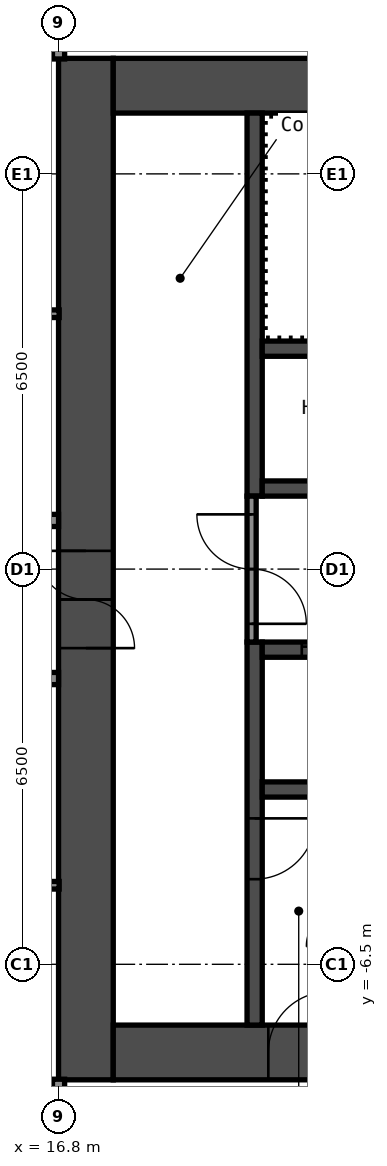
"""IFC4 building model, lengths in metres.
Left out: names, types, materials, properties, quantities, classifications, styles, units other than length and angle.
Written with IfcOpenShell. Run it as: python <this file> out.ifc"""

import sys

from ifc_helpers import new_model, si_unit, direction, frame, frame_2d, origin, place, context, subcontext, project, spatial, rectangle, extrude, element, fill, save


model = new_model("IFC4")
c1 = context("Model", 3, precision=1e-05, world=origin(), true_north=direction((0.0, 1.0)))
c2 = subcontext(c1, "Body", "Model", "MODEL_VIEW")
j1 = project(units=[si_unit("LENGTHUNIT", "METRE"), si_unit("PLANEANGLEUNIT", "RADIAN")], contexts=[c1])
p1 = place(None, origin())
s1 = spatial("IfcSite", under=j1, at=p1, CompositionType="ELEMENT")
p2 = place(p1, origin())
s2 = spatial("IfcBuilding", under=s1, at=p2, CompositionType="ELEMENT")
p3 = place(p2, frame((0.0, 0.0, 172.6)))
s3 = spatial("IfcBuildingStorey", under=s2, at=p3, CompositionType="ELEMENT", Elevation=172.6)
p4 = place(p3, frame((17.25, -8.4, 0.0), z_axis=(0.0, 0.0, 1.0), x_axis=(0.0, 1.0, 0.0)))
e1 = element("IfcWall", 1, at=p4, inside=s3, PredefinedType="SHEAR", context=c2, shape_type="SweptSolid", body=[
    extrude(rectangle(XDim=16.8, YDim=0.9, at=frame_2d((8.4, 0.0))), origin(), (0.0, 0.0, 1.0), 2.9),
])
p5 = place(p4, frame((7.1, 0.0, 0.0)))
e2 = element("IfcOpeningElement", 2, at=p5, cuts=e1, PredefinedType="OPENING", context=c2, shape_type="SweptSolid", body=[
    extrude(rectangle(XDim=1.6, YDim=2.1, at=frame_2d((0.8, 1.05))), frame((0.0, 0.46, 0.0), z_axis=(0.0, -1.0, 0.0), x_axis=(1.0, 0.0, 0.0)), (0.0, 0.0, 1.0), 0.92),
])
p6 = place(p3, frame((17.7, 7.95, 0.0), z_axis=(0.0, 0.0, 1.0), x_axis=(1.0, 0.0, 0.0)))
e3 = element("IfcWall", 3, at=p6, inside=s3, PredefinedType="SHEAR", context=c2, shape_type="SweptSolid", body=[
    extrude(rectangle(XDim=15.0, YDim=0.9, at=frame_2d((7.5, 0.0))), origin(), (0.0, 0.0, 1.0), 2.9),
])
p7 = place(p6, frame((10.4, 0.0, 0.0)))
e4 = element("IfcOpeningElement", 4, at=p7, cuts=e3, PredefinedType="OPENING", context=c2, shape_type="SweptSolid", body=[
    extrude(rectangle(XDim=1.2, YDim=2.1, at=frame_2d((0.6, 1.05))), frame((0.0, 0.46, 0.0), z_axis=(0.0, -1.0, 0.0), x_axis=(1.0, 0.0, 0.0)), (0.0, 0.0, 1.0), 0.92),
])
p8 = place(p6, frame((13.35, 0.0, 0.0)))
e5 = element("IfcOpeningElement", 5, at=p8, cuts=e3, PredefinedType="OPENING", context=c2, shape_type="SweptSolid", body=[
    extrude(rectangle(XDim=0.9, YDim=2.1, at=frame_2d((0.45, 1.05))), frame((0.0, 0.46, 0.0), z_axis=(0.0, -1.0, 0.0), x_axis=(1.0, 0.0, 0.0)), (0.0, 0.0, 1.0), 0.92),
])
p9 = place(p3, frame((17.7, -7.95, 0.0), z_axis=(0.0, 0.0, 1.0), x_axis=(1.0, 0.0, 0.0)))
e6 = element("IfcWall", 6, at=p9, inside=s3, PredefinedType="SHEAR", context=c2, shape_type="SweptSolid", body=[
    extrude(rectangle(XDim=15.0, YDim=0.9, at=frame_2d((7.5, 0.0))), origin(), (0.0, 0.0, 1.0), 2.9),
])
p10 = place(p9, frame((2.55, 0.0, 0.0)))
e7 = element("IfcOpeningElement", 7, at=p10, cuts=e6, PredefinedType="OPENING", context=c2, shape_type="SweptSolid", body=[
    extrude(rectangle(XDim=1.0, YDim=2.1, at=frame_2d((0.5, 1.05))), frame((0.0, 0.46, 0.0), z_axis=(0.0, -1.0, 0.0), x_axis=(1.0, 0.0, 0.0)), (0.0, 0.0, 1.0), 0.92),
])
p11 = place(p3, frame((20.025, 1.2, 0.0), z_axis=(0.0, 0.0, 1.0), x_axis=(0.0, 1.0, 0.0)))
e8 = element("IfcWall", 8, at=p11, inside=s3, PredefinedType="SHEAR", context=c2, shape_type="SweptSolid", body=[
    extrude(rectangle(XDim=6.3, YDim=0.25, at=frame_2d((3.15, 0.0))), origin(), (0.0, 0.0, 1.0), 2.9),
])
p12 = place(p3, frame((20.025, -7.5, 0.0), z_axis=(0.0, 0.0, 1.0), x_axis=(0.0, 1.0, 0.0)))
e9 = element("IfcWall", 9, at=p12, inside=s3, PredefinedType="SHEAR", context=c2, shape_type="SweptSolid", body=[
    extrude(rectangle(XDim=6.3, YDim=0.25, at=frame_2d((3.15, 0.0))), origin(), (0.0, 0.0, 1.0), 2.9),
])
p13 = place(p12, frame((2.4, 0.0, 0.0)))
e10 = element("IfcOpeningElement", 10, at=p13, cuts=e9, PredefinedType="OPENING", context=c2, shape_type="SweptSolid", body=[
    extrude(rectangle(XDim=1.0, YDim=2.1, at=frame_2d((0.5, 1.05))), frame((0.0, 0.135, 0.0), z_axis=(0.0, -1.0, 0.0), x_axis=(1.0, 0.0, 0.0)), (0.0, 0.0, 1.0), 0.27),
])
p14 = place(p3, frame((20.15, 1.325, 0.0), z_axis=(0.0, 0.0, 1.0), x_axis=(1.0, 0.0, 0.0)))
e11 = element("IfcWall", 11, at=p14, inside=s3, PredefinedType="SHEAR", context=c2, shape_type="SweptSolid", body=[
    extrude(rectangle(XDim=7.5, YDim=0.25, at=frame_2d((3.75, 0.0))), origin(), (0.0, 0.0, 1.0), 2.9),
])
p15 = place(p14, frame((2.038, 0.0, 0.0)))
e12 = element("IfcOpeningElement", 12, at=p15, cuts=e11, PredefinedType="OPENING", context=c2, shape_type="SweptSolid", body=[
    extrude(rectangle(XDim=0.9, YDim=2.1, at=frame_2d((0.45, 1.05))), frame((0.0, 0.135, 0.0), z_axis=(0.0, -1.0, 0.0), x_axis=(1.0, 0.0, 0.0)), (0.0, 0.0, 1.0), 0.27),
])
p16 = place(p14, frame((5.738, 0.0, 0.0)))
e13 = element("IfcOpeningElement", 13, at=p16, cuts=e11, PredefinedType="OPENING", context=c2, shape_type="SweptSolid", body=[
    extrude(rectangle(XDim=0.9, YDim=2.1, at=frame_2d((0.45, 1.05))), frame((0.0, 0.135, 0.0), z_axis=(0.0, -1.0, 0.0), x_axis=(1.0, 0.0, 0.0)), (0.0, 0.0, 1.0), 0.27),
])
p17 = place(p3, frame((20.15, 3.625, 0.0), z_axis=(0.0, 0.0, 1.0), x_axis=(1.0, 0.0, 0.0)))
e14 = element("IfcWall", 14, at=p17, inside=s3, PredefinedType="SHEAR", context=c2, shape_type="SweptSolid", body=[
    extrude(rectangle(XDim=7.5, YDim=0.25, at=frame_2d((3.75, 0.0))), origin(), (0.0, 0.0, 1.0), 2.9),
])
p18 = place(p3, frame((20.15, -1.325, 0.0), z_axis=(0.0, 0.0, 1.0), x_axis=(1.0, 0.0, 0.0)))
e15 = element("IfcWall", 15, at=p18, inside=s3, PredefinedType="SHEAR", context=c2, shape_type="SweptSolid", body=[
    extrude(rectangle(XDim=7.5, YDim=0.25, at=frame_2d((3.75, 0.0))), origin(), (0.0, 0.0, 1.0), 2.9),
])
p19 = place(p18, frame((0.65, 0.0, 0.0)))
e16 = element("IfcOpeningElement", 16, at=p19, cuts=e15, PredefinedType="OPENING", context=c2, shape_type="SweptSolid", body=[
    extrude(rectangle(XDim=1.1, YDim=2.1, at=frame_2d((0.55, 1.05))), frame((0.0, 0.135, 0.0), z_axis=(0.0, -1.0, 0.0), x_axis=(1.0, 0.0, 0.0)), (0.0, 0.0, 1.0), 0.27),
])
p20 = place(p18, frame((3.05, 0.0, 0.0)))
e17 = element("IfcOpeningElement", 17, at=p20, cuts=e15, PredefinedType="OPENING", context=c2, shape_type="SweptSolid", body=[
    extrude(rectangle(XDim=1.1, YDim=2.1, at=frame_2d((0.55, 1.05))), frame((0.0, 0.135, 0.0), z_axis=(0.0, -1.0, 0.0), x_axis=(1.0, 0.0, 0.0)), (0.0, 0.0, 1.0), 0.27),
])
p21 = place(p18, frame((5.45, 0.0, 0.0)))
e18 = element("IfcOpeningElement", 18, at=p21, cuts=e15, PredefinedType="OPENING", context=c2, shape_type="SweptSolid", body=[
    extrude(rectangle(XDim=1.1, YDim=2.1, at=frame_2d((0.55, 1.05))), frame((0.0, 0.135, 0.0), z_axis=(0.0, -1.0, 0.0), x_axis=(1.0, 0.0, 0.0)), (0.0, 0.0, 1.0), 0.27),
])
p22 = place(p3, frame((20.15, -3.625, 0.0), z_axis=(0.0, 0.0, 1.0), x_axis=(1.0, 0.0, 0.0)))
e19 = element("IfcWall", 19, at=p22, inside=s3, PredefinedType="SHEAR", context=c2, shape_type="SweptSolid", body=[
    extrude(rectangle(XDim=7.5, YDim=0.25, at=frame_2d((3.75, 0.0))), origin(), (0.0, 0.0, 1.0), 2.9),
])
p23 = place(p3, frame((19.975, -1.2, 0.0), z_axis=(0.0, 0.0, 1.0), x_axis=(0.0, 1.0, 0.0)))
e20 = element("IfcWall", 20, at=p23, inside=s3, PredefinedType="PARTITIONING", context=c2, shape_type="SweptSolid", body=[
    extrude(rectangle(XDim=2.4, YDim=0.15, at=frame_2d((1.2, 0.0))), origin(), (0.0, 0.0, 1.0), 2.9),
])
p24 = place(p23, frame((0.3, 0.0, 0.0)))
e21 = element("IfcOpeningElement", 21, at=p24, cuts=e20, PredefinedType="OPENING", context=c2, shape_type="SweptSolid", body=[
    extrude(rectangle(XDim=1.8, YDim=2.1, at=frame_2d((0.9, 1.05))), frame((0.0, 0.085, 0.0), z_axis=(0.0, -1.0, 0.0), x_axis=(1.0, 0.0, 0.0)), (0.0, 0.0, 1.0), 0.17),
])
p25 = place(p3, frame((13.462, -5.2, 0.0), z_axis=(0.0, 0.0, 1.0), x_axis=(1.0, 0.0, 0.0)))
e22 = element("IfcWall", 22, at=p25, inside=s3, PredefinedType="PARTITIONING", context=c2, shape_type="SweptSolid", body=[
    extrude(rectangle(XDim=3.348, YDim=0.125, at=frame_2d((1.674, 0.0))), origin(), (0.0, 0.0, 1.0), 2.9),
])
p26 = place(p25, frame((1.238, 0.0, 0.0)))
e23 = element("IfcOpeningElement", 23, at=p26, cuts=e22, PredefinedType="OPENING", context=c2, shape_type="SweptSolid", body=[
    extrude(rectangle(XDim=0.8, YDim=2.1, at=frame_2d((0.4, 1.05))), frame((0.0, 0.073, 0.0), z_axis=(0.0, -1.0, 0.0), x_axis=(1.0, 0.0, 0.0)), (0.0, 0.0, 1.0), 0.145),
])
p27 = place(p3, frame((-16.8, -1.8, 0.0), z_axis=(0.0, 0.0, 1.0), x_axis=(1.0, 0.0, 0.0)))
e24 = element("IfcWall", 24, at=p27, inside=s3, PredefinedType="PARTITIONING", context=c2, shape_type="SweptSolid", body=[
    extrude(rectangle(XDim=33.6, YDim=0.2, at=frame_2d((16.8, 0.0))), origin(), (0.0, 0.0, 1.0), 2.9),
])
p28 = place(p27, frame((2.85, 0.0, 0.0)))
e25 = element("IfcOpeningElement", 25, at=p28, cuts=e24, PredefinedType="OPENING", context=c2, shape_type="SweptSolid", body=[
    extrude(rectangle(XDim=1.0, YDim=2.1, at=frame_2d((0.5, 1.05))), frame((0.0, 0.11, 0.0), z_axis=(0.0, -1.0, 0.0), x_axis=(1.0, 0.0, 0.0)), (0.0, 0.0, 1.0), 0.22),
])
p29 = place(p27, frame((4.55, 0.0, 0.0)))
e26 = element("IfcOpeningElement", 26, at=p29, cuts=e24, PredefinedType="OPENING", context=c2, shape_type="SweptSolid", body=[
    extrude(rectangle(XDim=1.0, YDim=2.1, at=frame_2d((0.5, 1.05))), frame((0.0, 0.11, 0.0), z_axis=(0.0, -1.0, 0.0), x_axis=(1.0, 0.0, 0.0)), (0.0, 0.0, 1.0), 0.22),
])
p30 = place(p27, frame((12.1, 0.0, 0.0)))
e27 = element("IfcOpeningElement", 27, at=p30, cuts=e24, PredefinedType="OPENING", context=c2, shape_type="SweptSolid", body=[
    extrude(rectangle(XDim=1.0, YDim=2.1, at=frame_2d((0.5, 1.05))), frame((0.0, 0.11, 0.0), z_axis=(0.0, -1.0, 0.0), x_axis=(1.0, 0.0, 0.0)), (0.0, 0.0, 1.0), 0.22),
])
p31 = place(p27, frame((19.65, 0.0, 0.0)))
e28 = element("IfcOpeningElement", 28, at=p31, cuts=e24, PredefinedType="OPENING", context=c2, shape_type="SweptSolid", body=[
    extrude(rectangle(XDim=1.0, YDim=2.1, at=frame_2d((0.5, 1.05))), frame((0.0, 0.11, 0.0), z_axis=(0.0, -1.0, 0.0), x_axis=(1.0, 0.0, 0.0)), (0.0, 0.0, 1.0), 0.22),
])
p32 = place(p27, frame((21.35, 0.0, 0.0)))
e29 = element("IfcOpeningElement", 29, at=p32, cuts=e24, PredefinedType="OPENING", context=c2, shape_type="SweptSolid", body=[
    extrude(rectangle(XDim=1.0, YDim=2.1, at=frame_2d((0.5, 1.05))), frame((0.0, 0.11, 0.0), z_axis=(0.0, -1.0, 0.0), x_axis=(1.0, 0.0, 0.0)), (0.0, 0.0, 1.0), 0.22),
])
p33 = place(p27, frame((27.2, 0.0, 0.0)))
e30 = element("IfcOpeningElement", 30, at=p33, cuts=e24, PredefinedType="OPENING", context=c2, shape_type="SweptSolid", body=[
    extrude(rectangle(XDim=1.0, YDim=2.1, at=frame_2d((0.5, 1.05))), frame((0.0, 0.11, 0.0), z_axis=(0.0, -1.0, 0.0), x_axis=(1.0, 0.0, 0.0)), (0.0, 0.0, 1.0), 0.22),
])
p34 = place(p3, frame((-16.8, 0.8, 0.0), z_axis=(0.0, 0.0, 1.0), x_axis=(1.0, 0.0, 0.0)))
e31 = element("IfcWall", 31, at=p34, inside=s3, PredefinedType="PARTITIONING", context=c2, shape_type="SweptSolid", body=[
    extrude(rectangle(XDim=33.6, YDim=0.2, at=frame_2d((16.8, 0.0))), origin(), (0.0, 0.0, 1.0), 2.9),
])
p35 = place(p34, frame((2.85, 0.0, 0.0)))
e32 = element("IfcOpeningElement", 32, at=p35, cuts=e31, PredefinedType="OPENING", context=c2, shape_type="SweptSolid", body=[
    extrude(rectangle(XDim=1.0, YDim=2.1, at=frame_2d((0.5, 1.05))), frame((0.0, 0.11, 0.0), z_axis=(0.0, -1.0, 0.0), x_axis=(1.0, 0.0, 0.0)), (0.0, 0.0, 1.0), 0.22),
])
p36 = place(p34, frame((4.55, 0.0, 0.0)))
e33 = element("IfcOpeningElement", 33, at=p36, cuts=e31, PredefinedType="OPENING", context=c2, shape_type="SweptSolid", body=[
    extrude(rectangle(XDim=1.0, YDim=2.1, at=frame_2d((0.5, 1.05))), frame((0.0, 0.11, 0.0), z_axis=(0.0, -1.0, 0.0), x_axis=(1.0, 0.0, 0.0)), (0.0, 0.0, 1.0), 0.22),
])
p37 = place(p34, frame((13.8, 0.0, 0.0)))
e34 = element("IfcOpeningElement", 34, at=p37, cuts=e31, PredefinedType="OPENING", context=c2, shape_type="SweptSolid", body=[
    extrude(rectangle(XDim=1.0, YDim=2.1, at=frame_2d((0.5, 1.05))), frame((0.0, 0.11, 0.0), z_axis=(0.0, -1.0, 0.0), x_axis=(1.0, 0.0, 0.0)), (0.0, 0.0, 1.0), 0.22),
])
p38 = place(p34, frame((19.65, 0.0, 0.0)))
e35 = element("IfcOpeningElement", 35, at=p38, cuts=e31, PredefinedType="OPENING", context=c2, shape_type="SweptSolid", body=[
    extrude(rectangle(XDim=1.0, YDim=2.1, at=frame_2d((0.5, 1.05))), frame((0.0, 0.11, 0.0), z_axis=(0.0, -1.0, 0.0), x_axis=(1.0, 0.0, 0.0)), (0.0, 0.0, 1.0), 0.22),
])
p39 = place(p34, frame((21.35, 0.0, 0.0)))
e36 = element("IfcOpeningElement", 36, at=p39, cuts=e31, PredefinedType="OPENING", context=c2, shape_type="SweptSolid", body=[
    extrude(rectangle(XDim=1.0, YDim=2.1, at=frame_2d((0.5, 1.05))), frame((0.0, 0.11, 0.0), z_axis=(0.0, -1.0, 0.0), x_axis=(1.0, 0.0, 0.0)), (0.0, 0.0, 1.0), 0.22),
])
p40 = place(p34, frame((27.1, 0.0, 0.0)))
e37 = element("IfcOpeningElement", 37, at=p40, cuts=e31, PredefinedType="OPENING", context=c2, shape_type="SweptSolid", body=[
    extrude(rectangle(XDim=1.0, YDim=2.1, at=frame_2d((0.5, 1.05))), frame((0.0, 0.11, 0.0), z_axis=(0.0, -1.0, 0.0), x_axis=(1.0, 0.0, 0.0)), (0.0, 0.0, 1.0), 0.22),
])
p41 = place(p3, frame((13.262, 4.2, 0.0), z_axis=(0.0, 0.0, 1.0), x_axis=(1.0, 0.0, 0.0)))
e38 = element("IfcWall", 38, at=p41, inside=s3, PredefinedType="PARTITIONING", context=c2, shape_type="SweptSolid", body=[
    extrude(rectangle(XDim=3.548, YDim=0.125, at=frame_2d((1.774, 0.0))), origin(), (0.0, 0.0, 1.0), 2.9),
])
p42 = place(p3, frame((16.8, -19.3, 0.0), z_axis=(0.0, 0.0, 1.0), x_axis=(0.0, 1.0, 0.0)))
e39 = element("IfcWall", 39, at=p42, inside=s3, PredefinedType="PARTITIONING", context=c2, shape_type="SweptSolid", body=[
    extrude(rectangle(XDim=10.91, YDim=0.2, at=frame_2d((5.455, 0.0))), origin(), (0.0, 0.0, 1.0), 2.9),
])
p43 = place(p3, frame((16.8, 8.39, 0.0), z_axis=(0.0, 0.0, 1.0), x_axis=(0.0, 1.0, 0.0)))
e40 = element("IfcWall", 40, at=p43, inside=s3, PredefinedType="PARTITIONING", context=c2, shape_type="SweptSolid", body=[
    extrude(rectangle(XDim=9.91, YDim=0.2, at=frame_2d((4.955, 0.0))), origin(), (0.0, 0.0, 1.0), 2.9),
])
p44 = place(p5, origin())
e41 = element("IfcDoor", 41, at=p44, inside=s3, OperationType="DOUBLE_DOOR_SINGLE_SWING", PredefinedType="DOOR", context=c2, shape_type="SweptSolid", body=[
    extrude(rectangle(XDim=1.6, YDim=2.1, at=frame_2d((0.8, 1.05))), frame((0.0, 0.025, 0.0), z_axis=(0.0, -1.0, 0.0), x_axis=(1.0, 0.0, 0.0)), (0.0, 0.0, 1.0), 0.05),
])
fill(e2, e41)
p45 = place(p10, origin())
e42 = element("IfcDoor", 42, at=p45, inside=s3, OperationType="SINGLE_SWING_LEFT", PredefinedType="DOOR", context=c2, shape_type="SweptSolid", body=[
    extrude(rectangle(XDim=1.0, YDim=2.1, at=frame_2d((0.5, 1.05))), frame((0.0, 0.025, 0.0), z_axis=(0.0, -1.0, 0.0), x_axis=(1.0, 0.0, 0.0)), (0.0, 0.0, 1.0), 0.05),
])
fill(e7, e42)
p46 = place(p13, origin())
e43 = element("IfcDoor", 43, at=p46, inside=s3, OperationType="SINGLE_SWING_RIGHT", PredefinedType="DOOR", context=c2, shape_type="SweptSolid", body=[
    extrude(rectangle(XDim=1.0, YDim=2.1, at=frame_2d((0.5, 1.05))), frame((0.0, 0.025, 0.0), z_axis=(0.0, -1.0, 0.0), x_axis=(1.0, 0.0, 0.0)), (0.0, 0.0, 1.0), 0.05),
])
fill(e10, e43)
p47 = place(p24, origin())
e44 = element("IfcDoor", 44, at=p47, inside=s3, OperationType="DOUBLE_DOOR_SINGLE_SWING", PredefinedType="DOOR", context=c2, shape_type="SweptSolid", body=[
    extrude(rectangle(XDim=1.8, YDim=2.1, at=frame_2d((0.9, 1.05))), frame((0.0, 0.025, 0.0), z_axis=(0.0, -1.0, 0.0), x_axis=(1.0, 0.0, 0.0)), (0.0, 0.0, 1.0), 0.05),
])
fill(e21, e44)
p48 = place(p19, origin())
e45 = element("IfcDoor", 45, at=p48, inside=s3, OperationType="DOUBLE_DOOR_SLIDING", PredefinedType="DOOR", context=c2, shape_type="SweptSolid", body=[
    extrude(rectangle(XDim=1.1, YDim=2.1, at=frame_2d((0.55, 1.05))), frame((0.0, 0.025, 0.0), z_axis=(0.0, -1.0, 0.0), x_axis=(1.0, 0.0, 0.0)), (0.0, 0.0, 1.0), 0.05),
])
fill(e16, e45)
save(model, sys.argv[1])
